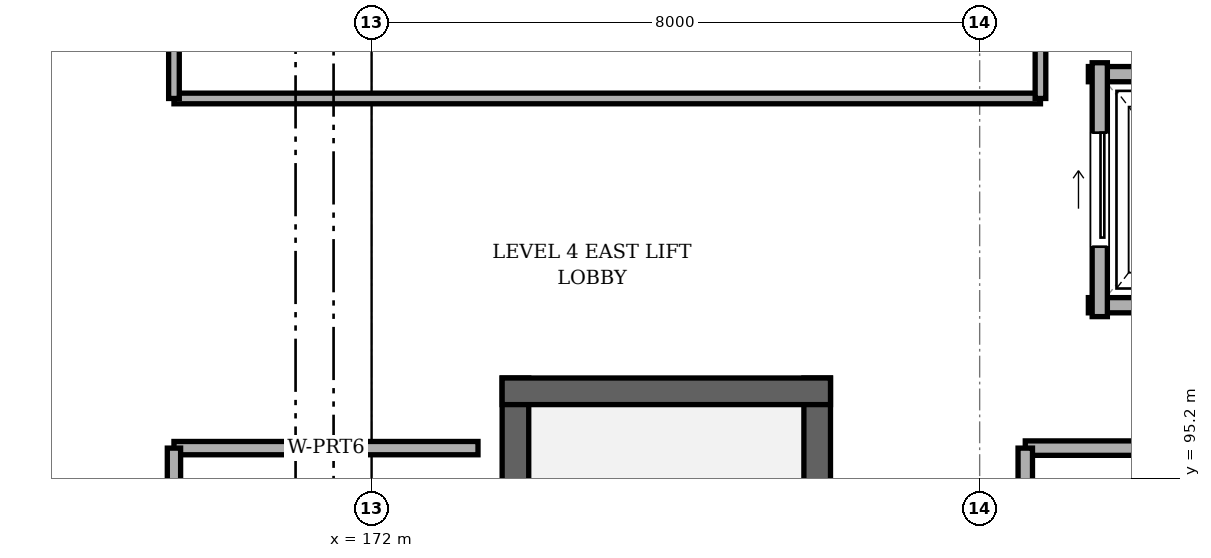
"""IFC4 building model, lengths in metres.
Left out: names, types, materials, properties, quantities, classifications, styles, units other than length and angle.
Written with IfcOpenShell. Run it as: python <this file> out.ifc"""

import sys

from ifc_helpers import new_model, si_unit, direction, frame, frame_2d, origin, place, context, subcontext, project, spatial, rectangle, extrude, element, fill, save


model = new_model("IFC4")
c1 = context("Model", 3, precision=1e-05, world=origin(), true_north=direction((0.0, 1.0)))
c2 = subcontext(c1, "Body", "Model", "MODEL_VIEW")
j1 = project(units=[si_unit("LENGTHUNIT", "METRE"), si_unit("PLANEANGLEUNIT", "RADIAN")], contexts=[c1])
p1 = place(None, origin())
s1 = spatial("IfcSite", under=j1, at=p1, CompositionType="ELEMENT")
p2 = place(p1, origin())
s2 = spatial("IfcBuilding", under=s1, at=p2, CompositionType="ELEMENT")
p3 = place(p2, frame((0.0, 0.0, 17.6)))
s3 = spatial("IfcBuildingStorey", under=s2, at=p3, CompositionType="ELEMENT", Elevation=17.6)
for number, where, z_axis, x_axis in (
    (1, (177.863, 86.025, 0.0), (0.0, 0.0, 1.0), (0.0, 1.0, 0.0)),
    (2, (173.893, 96.522, 0.0), (0.0, 0.0, 1.0), (0.0, -1.0, 0.0)),
):
    element("IfcWall", number, at=place(p3, frame(where, z_axis=z_axis, x_axis=x_axis)), inside=s3, PredefinedType="SHEAR", context=c2, shape_type="SweptSolid", body=[
        extrude(rectangle(XDim=10.498, YDim=0.35, at=frame_2d((5.249, 0.0))), origin(), (0.0, 0.0, 1.0), 2.98),
    ])
p4 = place(p3, frame((178.038, 96.347, 0.0), z_axis=(0.0, 0.0, 1.0), x_axis=(-1.0, 0.0, 0.0)))
e3 = element("IfcWall", 3, at=p4, inside=s3, PredefinedType="SHEAR", context=c2, shape_type="SweptSolid", body=[
    extrude(rectangle(XDim=4.32, YDim=0.35, at=frame_2d((2.16, 0.0))), origin(), (0.0, 0.0, 1.0), 2.98),
])
for number, where, z_axis, x_axis in (
    (4, (181.43, 97.48, 0.0), (0.0, 0.0, 1.0), (1.0, 0.0, 0.0)),
    (5, (184.17, 100.52, 0.0), (0.0, 0.0, 1.0), (-1.0, 0.0, 0.0)),
):
    element("IfcWall", number, at=place(p3, frame(where, z_axis=z_axis, x_axis=x_axis)), inside=s3, PredefinedType="SOLIDWALL", context=c2, shape_type="SweptSolid", body=[
        extrude(rectangle(XDim=2.74, YDim=0.2, at=frame_2d((1.37, 0.0))), origin(), (0.0, 0.0, 1.0), 2.955),
    ])
p5 = place(p3, frame((181.58, 100.67, 0.0), z_axis=(0.0, 0.0, 1.0), x_axis=(0.0, -1.0, 0.0)))
e6 = element("IfcWall", 6, at=p5, inside=s3, PredefinedType="SOLIDWALL", context=c2, shape_type="SweptSolid", body=[
    extrude(rectangle(XDim=3.34, YDim=0.2, at=frame_2d((1.67, 0.0))), origin(), (0.0, 0.0, 1.0), 2.955),
])
p6 = place(p5, frame((0.92, 0.0, 0.0)))
e7 = element("IfcOpeningElement", 7, at=p6, cuts=e6, PredefinedType="OPENING", context=c2, shape_type="SweptSolid", body=[
    extrude(rectangle(XDim=1.5, YDim=2.2, at=frame_2d((0.75, 1.1))), frame((0.0, 0.11, 0.0), z_axis=(0.0, -1.0, 0.0), x_axis=(1.0, 0.0, 0.0)), (0.0, 0.0, 1.0), 0.22),
])
p7 = place(p3, frame((180.8, 100.2, 0.0), z_axis=(0.0, 0.0, 1.0), x_axis=(-1.0, 0.0, 0.0)))
e8 = element("IfcWall", 8, at=p7, inside=s3, PredefinedType="PARTITIONING", context=c2, shape_type="SweptSolid", body=[
    extrude(rectangle(XDim=11.4, YDim=0.14, at=frame_2d((5.7, 0.0))), origin(), (0.0, 0.0, 1.0), 2.565),
])
p8 = place(p3, frame((169.4, 100.2, 0.0), z_axis=(0.0, 0.0, 1.0), x_axis=(0.0, 1.0, 0.0)))
e9 = element("IfcWall", 9, at=p8, inside=s3, PredefinedType="PARTITIONING", context=c2, shape_type="SweptSolid", body=[
    extrude(rectangle(XDim=3.2, YDim=0.14, at=frame_2d((1.6, 0.0))), origin(), (0.0, 0.0, 1.0), 2.515),
])
p9 = place(p8, frame((1.075, 0.0, 0.0)))
e10 = element("IfcOpeningElement", 10, at=p9, cuts=e9, PredefinedType="OPENING", context=c2, shape_type="SweptSolid", body=[
    extrude(rectangle(XDim=1.05, YDim=2.1, at=frame_2d((0.525, 1.05))), frame((0.0, 0.08, 0.0), z_axis=(0.0, -1.0, 0.0), x_axis=(1.0, 0.0, 0.0)), (0.0, 0.0, 1.0), 0.16),
])
p10 = place(p3, frame((180.8, 103.4, 0.0), z_axis=(0.0, 0.0, 1.0), x_axis=(0.0, -1.0, 0.0)))
e11 = element("IfcWall", 11, at=p10, inside=s3, PredefinedType="PARTITIONING", context=c2, shape_type="SweptSolid", body=[
    extrude(rectangle(XDim=3.2, YDim=0.14, at=frame_2d((1.6, 0.0))), origin(), (0.0, 0.0, 1.0), 2.355),
])
p11 = place(p3, frame((180.6, 95.6, 0.0), z_axis=(0.0, 0.0, 1.0), x_axis=(1.0, 0.0, 0.0)))
e12 = element("IfcWall", 12, at=p11, inside=s3, PredefinedType="PARTITIONING", context=c2, shape_type="SweptSolid", body=[
    extrude(rectangle(XDim=6.6, YDim=0.19, at=frame_2d((3.3, 0.0))), origin(), (0.0, 0.0, 1.0), 2.495),
])
p12 = place(p11, frame((2.775, 0.0, 0.0)))
e13 = element("IfcOpeningElement", 13, at=p12, cuts=e12, PredefinedType="OPENING", context=c2, shape_type="SweptSolid", body=[
    extrude(rectangle(XDim=1.05, YDim=2.1, at=frame_2d((0.525, 1.05))), frame((0.0, 0.105, 0.0), z_axis=(0.0, -1.0, 0.0), x_axis=(1.0, 0.0, 0.0)), (0.0, 0.0, 1.0), 0.21),
])
p13 = place(p3, frame((180.6, 86.4, 0.0), z_axis=(0.0, 0.0, 1.0), x_axis=(0.0, 1.0, 0.0)))
e14 = element("IfcWall", 14, at=p13, inside=s3, PredefinedType="PARTITIONING", context=c2, shape_type="SweptSolid", body=[
    extrude(rectangle(XDim=9.2, YDim=0.19, at=frame_2d((4.6, 0.0))), origin(), (0.0, 0.0, 1.0), 2.515),
])
p14 = place(p3, frame((169.4, 95.6, 0.0), z_axis=(0.0, 0.0, 1.0), x_axis=(1.0, 0.0, 0.0)))
e15 = element("IfcWall", 15, at=p14, inside=s3, PredefinedType="PARTITIONING", context=c2, shape_type="SweptSolid", body=[
    extrude(rectangle(XDim=4.0, YDim=0.175, at=frame_2d((2.0, 0.0))), origin(), (0.0, 0.0, 1.0), 2.565),
])
p15 = place(p3, frame((169.4, 84.4, 0.0), z_axis=(0.0, 0.0, 1.0), x_axis=(0.0, 1.0, 0.0)))
e16 = element("IfcWall", 16, at=p15, inside=s3, PredefinedType="PARTITIONING", context=c2, shape_type="SweptSolid", body=[
    extrude(rectangle(XDim=11.2, YDim=0.175, at=frame_2d((5.6, 0.0))), origin(), (0.0, 0.0, 1.0), 2.515),
])
p16 = place(p15, frame((5.075, 0.0, 0.0)))
e17 = element("IfcOpeningElement", 17, at=p16, cuts=e16, PredefinedType="OPENING", context=c2, shape_type="SweptSolid", body=[
    extrude(rectangle(XDim=1.05, YDim=2.1, at=frame_2d((0.525, 1.05))), frame((0.0, 0.097, 0.0), z_axis=(0.0, -1.0, 0.0), x_axis=(1.0, 0.0, 0.0)), (0.0, 0.0, 1.0), 0.195),
])
p17 = place(p6, origin())
e18 = element("IfcDoor", 18, at=p17, inside=s3, OperationType="SLIDING_TO_LEFT", PredefinedType="DOOR", context=c2, shape_type="SweptSolid", body=[
    extrude(rectangle(XDim=1.5, YDim=2.2, at=frame_2d((0.75, 1.1))), frame((0.0, 0.025, 0.0), z_axis=(0.0, -1.0, 0.0), x_axis=(1.0, 0.0, 0.0)), (0.0, 0.0, 1.0), 0.05),
])
fill(e7, e18)
save(model, sys.argv[1])
